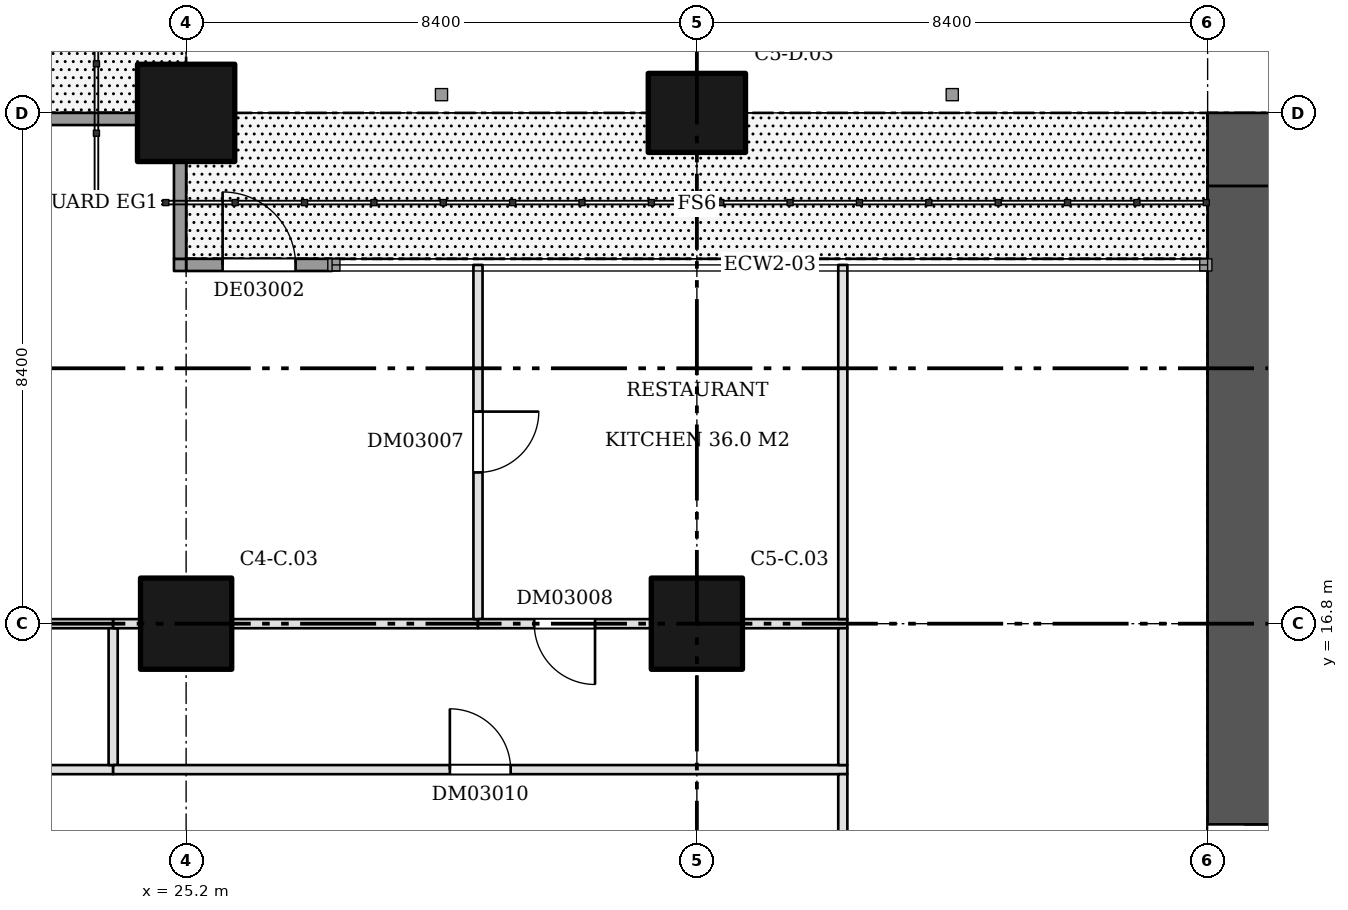
"""IFC4 building model, lengths in metres.
Left out: names, types, materials, properties, quantities, classifications, styles, units other than length and angle.
Written with IfcOpenShell. Run it as: python <this file> out.ifc"""

import sys

from ifc_helpers import new_model, si_unit, direction, frame, frame_2d, origin, origin_2d, place, context, subcontext, project, spatial, rectangle, extrude, element, fill, save


model = new_model("IFC4")
c1 = context("Model", 3, precision=1e-05, world=origin(), true_north=direction((0.0, 1.0)))
c2 = subcontext(c1, "Body", "Model", "MODEL_VIEW")
j1 = project(units=[si_unit("LENGTHUNIT", "METRE"), si_unit("PLANEANGLEUNIT", "RADIAN")], contexts=[c1])
p1 = place(None, origin())
s1 = spatial("IfcSite", under=j1, at=p1, CompositionType="ELEMENT")
p2 = place(p1, origin())
s2 = spatial("IfcBuilding", under=s1, at=p2, CompositionType="ELEMENT")
p3 = place(p2, frame((0.0, 0.0, 19.8)))
s3 = spatial("IfcBuildingStorey", under=s2, at=p3, CompositionType="ELEMENT", Elevation=19.8)
p4 = place(p3, frame((25.2, 16.8, 0.0), z_axis=(0.0, 0.0, 1.0), x_axis=(1.0, 0.0, 0.0)))
e1 = element("IfcColumn", 1, at=p4, inside=s3, PredefinedType="COLUMN", context=c2, shape_type="SweptSolid", body=[
    extrude(rectangle(XDim=1.5, YDim=1.5, at=origin_2d()), origin(), (0.0, 0.0, 1.0), 5.12),
])
p5 = place(p3, frame((25.2, 25.2, 0.0), z_axis=(0.0, 0.0, 1.0), x_axis=(1.0, 0.0, 0.0)))
e2 = element("IfcColumn", 2, at=p5, inside=s3, PredefinedType="COLUMN", context=c2, shape_type="SweptSolid", body=[
    extrude(rectangle(XDim=1.6, YDim=1.6, at=origin_2d()), origin(), (0.0, 0.0, 1.0), 5.12),
])
p6 = place(p3, frame((33.6, 16.8, 0.0), z_axis=(0.0, 0.0, 1.0), x_axis=(1.0, 0.0, 0.0)))
e3 = element("IfcColumn", 3, at=p6, inside=s3, PredefinedType="COLUMN", context=c2, shape_type="SweptSolid", body=[
    extrude(rectangle(XDim=1.5, YDim=1.5, at=origin_2d()), origin(), (0.0, 0.0, 1.0), 5.12),
])
p7 = place(p3, frame((33.6, 25.2, 0.0), z_axis=(0.0, 0.0, 1.0), x_axis=(1.0, 0.0, 0.0)))
e4 = element("IfcColumn", 4, at=p7, inside=s3, PredefinedType="COLUMN", context=c2, shape_type="SweptSolid", body=[
    extrude(rectangle(XDim=1.6, YDim=1.3, at=origin_2d()), origin(), (0.0, 0.0, 1.0), 5.12),
])
p8 = place(p3, frame((42.0, 24.6, 0.0), z_axis=(0.0, 0.0, 1.0), x_axis=(1.0, 0.0, 0.0)))
e5 = element("IfcWall", 5, at=p8, inside=s3, PredefinedType="SHEAR", context=c2, shape_type="SweptSolid", body=[
    extrude(rectangle(XDim=16.8, YDim=1.2, at=frame_2d((8.4, 0.0))), origin(), (0.0, 0.0, 1.0), 5.12),
])
p9 = place(p8, frame((1.8, 0.0, 0.5)))
e6 = element("IfcOpeningElement", 6, at=p9, cuts=e5, PredefinedType="OPENING", context=c2, shape_type="SweptSolid", body=[
    extrude(rectangle(XDim=1.8, YDim=2.4, at=frame_2d((0.9, 1.2))), frame((0.0, 0.61, 0.0), z_axis=(0.0, -1.0, 0.0), x_axis=(1.0, 0.0, 0.0)), (0.0, 0.0, 1.0), 1.22),
])
p10 = place(p8, frame((4.644, 0.0, 1.6)))
e7 = element("IfcOpeningElement", 7, at=p10, cuts=e5, PredefinedType="OPENING", context=c2, shape_type="SweptSolid", body=[
    extrude(rectangle(XDim=1.2, YDim=1.2, at=frame_2d((0.6, 0.6))), frame((0.0, 0.61, 0.0), z_axis=(0.0, -1.0, 0.0), x_axis=(1.0, 0.0, 0.0)), (0.0, 0.0, 1.0), 1.22),
])
p11 = place(p8, frame((6.45, 0.0, 1.6)))
e8 = element("IfcOpeningElement", 8, at=p11, cuts=e5, PredefinedType="OPENING", context=c2, shape_type="SweptSolid", body=[
    extrude(rectangle(XDim=1.8, YDim=1.2, at=frame_2d((0.9, 0.6))), frame((0.0, 0.61, 0.0), z_axis=(0.0, -1.0, 0.0), x_axis=(1.0, 0.0, 0.0)), (0.0, 0.0, 1.0), 1.22),
])
p12 = place(p8, frame((12.65, 0.0, 0.5)))
e9 = element("IfcOpeningElement", 9, at=p12, cuts=e5, PredefinedType="OPENING", context=c2, shape_type="SweptSolid", body=[
    extrude(rectangle(XDim=1.8, YDim=2.4, at=frame_2d((0.9, 1.2))), frame((0.0, 0.61, 0.0), z_axis=(0.0, -1.0, 0.0), x_axis=(1.0, 0.0, 0.0)), (0.0, 0.0, 1.0), 1.22),
])
p13 = place(p3, frame((42.6, 9.6, 0.0), z_axis=(0.0, 0.0, 1.0), x_axis=(0.0, 1.0, 0.0)))
e10 = element("IfcWall", 10, at=p13, inside=s3, PredefinedType="SHEAR", context=c2, shape_type="SweptSolid", body=[
    extrude(rectangle(XDim=14.4, YDim=1.2, at=frame_2d((7.2, 0.0))), origin(), (0.0, 0.0, 1.0), 5.12),
])
p14 = place(p13, frame((2.1, 0.0, 0.0)))
e11 = element("IfcOpeningElement", 11, at=p14, cuts=e10, PredefinedType="OPENING", context=c2, shape_type="SweptSolid", body=[
    extrude(rectangle(XDim=1.8, YDim=2.1, at=frame_2d((0.9, 1.05))), frame((0.0, 0.61, 0.0), z_axis=(0.0, -1.0, 0.0), x_axis=(1.0, 0.0, 0.0)), (0.0, 0.0, 1.0), 1.22),
])
p15 = place(p3, frame((16.9, 14.4, 0.0), z_axis=(0.0, 0.0, 1.0), x_axis=(1.0, 0.0, 0.0)))
e12 = element("IfcWall", 12, at=p15, inside=s3, PredefinedType="PARTITIONING", context=c2, shape_type="SweptSolid", body=[
    extrude(rectangle(XDim=7.1, YDim=0.15, at=frame_2d((3.55, 0.0))), origin(), (0.0, 0.0, 1.0), 5.12),
])
p16 = place(p15, frame((3.05, 0.0, 0.0)))
e13 = element("IfcOpeningElement", 13, at=p16, cuts=e12, PredefinedType="OPENING", context=c2, shape_type="SweptSolid", body=[
    extrude(rectangle(XDim=1.0, YDim=2.1, at=frame_2d((0.5, 1.05))), frame((0.0, 0.085, 0.0), z_axis=(0.0, -1.0, 0.0), x_axis=(1.0, 0.0, 0.0)), (0.0, 0.0, 1.0), 0.17),
])
p17 = place(p3, frame((18.55, 16.8, 0.0), z_axis=(0.0, 0.0, 1.0), x_axis=(1.0, 0.0, 0.0)))
e14 = element("IfcWall", 14, at=p17, inside=s3, PredefinedType="PARTITIONING", context=c2, shape_type="SweptSolid", body=[
    extrude(rectangle(XDim=5.45, YDim=0.15, at=frame_2d((2.725, 0.0))), origin(), (0.0, 0.0, 1.0), 5.12),
])
p18 = place(p3, frame((24.0, 14.475, 0.0), z_axis=(0.0, 0.0, 1.0), x_axis=(0.0, 1.0, 0.0)))
e15 = element("IfcWall", 15, at=p18, inside=s3, PredefinedType="PARTITIONING", context=c2, shape_type="SweptSolid", body=[
    extrude(rectangle(XDim=2.25, YDim=0.15, at=frame_2d((1.125, 0.0))), origin(), (0.0, 0.0, 1.0), 5.12),
])
p19 = place(p3, frame((24.0, 14.4, 0.0), z_axis=(0.0, 0.0, 1.0), x_axis=(1.0, 0.0, 0.0)))
e16 = element("IfcWall", 16, at=p19, inside=s3, PredefinedType="PARTITIONING", context=c2, shape_type="SweptSolid", body=[
    extrude(rectangle(XDim=12.075, YDim=0.15, at=frame_2d((6.038, 0.0))), origin(), (0.0, 0.0, 1.0), 5.12),
])
p20 = place(p19, frame((5.538, 0.0, 0.0)))
e17 = element("IfcOpeningElement", 17, at=p20, cuts=e16, PredefinedType="OPENING", context=c2, shape_type="SweptSolid", body=[
    extrude(rectangle(XDim=1.0, YDim=2.1, at=frame_2d((0.5, 1.05))), frame((0.0, 0.085, 0.0), z_axis=(0.0, -1.0, 0.0), x_axis=(1.0, 0.0, 0.0)), (0.0, 0.0, 1.0), 0.17),
])
p21 = place(p3, frame((24.0, 16.8, 0.0), z_axis=(0.0, 0.0, 1.0), x_axis=(1.0, 0.0, 0.0)))
e18 = element("IfcWall", 18, at=p21, inside=s3, PredefinedType="PARTITIONING", context=c2, shape_type="SweptSolid", body=[
    extrude(rectangle(XDim=0.45, YDim=0.15, at=frame_2d((0.225, 0.0))), origin(), (0.0, 0.0, 1.0), 5.12),
])
p22 = place(p3, frame((25.95, 16.8, 0.0), z_axis=(0.0, 0.0, 1.0), x_axis=(1.0, 0.0, 0.0)))
e19 = element("IfcWall", 19, at=p22, inside=s3, PredefinedType="PARTITIONING", context=c2, shape_type="SweptSolid", body=[
    extrude(rectangle(XDim=4.05, YDim=0.15, at=frame_2d((2.025, 0.0))), origin(), (0.0, 0.0, 1.0), 5.12),
])
p23 = place(p3, frame((30.0, 16.875, 0.0), z_axis=(0.0, 0.0, 1.0), x_axis=(0.0, 1.0, 0.0)))
e20 = element("IfcWall", 20, at=p23, inside=s3, PredefinedType="PARTITIONING", context=c2, shape_type="SweptSolid", body=[
    extrude(rectangle(XDim=5.825, YDim=0.15, at=frame_2d((2.913, 0.0))), origin(), (0.0, 0.0, 1.0), 5.12),
])
p24 = place(p23, frame((2.413, 0.0, 0.0)))
e21 = element("IfcOpeningElement", 21, at=p24, cuts=e20, PredefinedType="OPENING", context=c2, shape_type="SweptSolid", body=[
    extrude(rectangle(XDim=1.0, YDim=2.1, at=frame_2d((0.5, 1.05))), frame((0.0, 0.085, 0.0), z_axis=(0.0, -1.0, 0.0), x_axis=(1.0, 0.0, 0.0)), (0.0, 0.0, 1.0), 0.17),
])
p25 = place(p3, frame((30.0, 16.8, 0.0), z_axis=(0.0, 0.0, 1.0), x_axis=(1.0, 0.0, 0.0)))
e22 = element("IfcWall", 22, at=p25, inside=s3, PredefinedType="PARTITIONING", context=c2, shape_type="SweptSolid", body=[
    extrude(rectangle(XDim=2.85, YDim=0.15, at=frame_2d((1.425, 0.0))), origin(), (0.0, 0.0, 1.0), 5.12),
])
p26 = place(p25, frame((0.925, 0.0, 0.0)))
e23 = element("IfcOpeningElement", 23, at=p26, cuts=e22, PredefinedType="OPENING", context=c2, shape_type="SweptSolid", body=[
    extrude(rectangle(XDim=1.0, YDim=2.1, at=frame_2d((0.5, 1.05))), frame((0.0, 0.085, 0.0), z_axis=(0.0, -1.0, 0.0), x_axis=(1.0, 0.0, 0.0)), (0.0, 0.0, 1.0), 0.17),
])
p27 = place(p3, frame((34.35, 16.8, 0.0), z_axis=(0.0, 0.0, 1.0), x_axis=(1.0, 0.0, 0.0)))
e24 = element("IfcWall", 24, at=p27, inside=s3, PredefinedType="PARTITIONING", context=c2, shape_type="SweptSolid", body=[
    extrude(rectangle(XDim=1.725, YDim=0.15, at=frame_2d((0.862, 0.0))), origin(), (0.0, 0.0, 1.0), 5.12),
])
p28 = place(p3, frame((36.0, 10.875, 0.0), z_axis=(0.0, 0.0, 1.0), x_axis=(0.0, 1.0, 0.0)))
e25 = element("IfcWall", 25, at=p28, inside=s3, PredefinedType="PARTITIONING", context=c2, shape_type="SweptSolid", body=[
    extrude(rectangle(XDim=3.45, YDim=0.15, at=frame_2d((1.725, 0.0))), origin(), (0.0, 0.0, 1.0), 5.12),
])
p29 = place(p3, frame((36.0, 14.475, 0.0), z_axis=(0.0, 0.0, 1.0), x_axis=(0.0, 1.0, 0.0)))
e26 = element("IfcWall", 26, at=p29, inside=s3, PredefinedType="PARTITIONING", context=c2, shape_type="SweptSolid", body=[
    extrude(rectangle(XDim=2.25, YDim=0.15, at=frame_2d((1.125, 0.0))), origin(), (0.0, 0.0, 1.0), 5.12),
])
p30 = place(p3, frame((36.0, 16.875, 0.0), z_axis=(0.0, 0.0, 1.0), x_axis=(0.0, 1.0, 0.0)))
e27 = element("IfcWall", 27, at=p30, inside=s3, PredefinedType="PARTITIONING", context=c2, shape_type="SweptSolid", body=[
    extrude(rectangle(XDim=5.825, YDim=0.15, at=frame_2d((2.913, 0.0))), origin(), (0.0, 0.0, 1.0), 5.12),
])
p31 = place(p3, frame((27.6, 22.7, 0.0), z_axis=(0.0, 0.0, 1.0), x_axis=(-1.0, 0.0, 0.0)))
e28 = element("IfcWall", 28, at=p31, inside=s3, PredefinedType="SOLIDWALL", context=c2, shape_type="SweptSolid", body=[
    extrude(rectangle(XDim=2.4, YDim=0.2, at=frame_2d((1.2, 0.0))), origin(), (0.0, 0.0, 1.0), 5.12),
])
p32 = place(p31, frame((0.6, 0.0, 0.0)))
e29 = element("IfcOpeningElement", 29, at=p32, cuts=e28, PredefinedType="OPENING", context=c2, shape_type="SweptSolid", body=[
    extrude(rectangle(XDim=1.2, YDim=2.4, at=frame_2d((0.6, 1.2))), frame((0.0, 0.11, 0.0), z_axis=(0.0, -1.0, 0.0), x_axis=(1.0, 0.0, 0.0)), (0.0, 0.0, 1.0), 0.22),
])
p33 = place(p3, frame((25.2, 22.7, 0.0), z_axis=(0.0, 0.0, 1.0), x_axis=(-1.0, 0.0, 0.0)))
e30 = element("IfcWall", 30, at=p33, inside=s3, PredefinedType="SOLIDWALL", context=c2, shape_type="SweptSolid", body=[
    extrude(rectangle(XDim=0.2, YDim=0.2, at=frame_2d((0.1, 0.0))), origin(), (0.0, 0.0, 1.0), 5.12),
])
p34 = place(p3, frame((25.1, 22.8, 0.0), z_axis=(0.0, 0.0, 1.0), x_axis=(0.0, 1.0, 0.0)))
e31 = element("IfcWall", 31, at=p34, inside=s3, PredefinedType="SOLIDWALL", context=c2, shape_type="SweptSolid", body=[
    extrude(rectangle(XDim=1.6, YDim=0.2, at=frame_2d((0.8, 0.0))), origin(), (0.0, 0.0, 1.0), 5.12),
])
p35 = place(p3, frame((24.4, 25.1, 0.0), z_axis=(0.0, 0.0, 1.0), x_axis=(-1.0, 0.0, 0.0)))
e32 = element("IfcWall", 32, at=p35, inside=s3, PredefinedType="SOLIDWALL", context=c2, shape_type="SweptSolid", body=[
    extrude(rectangle(XDim=1.8, YDim=0.2, at=frame_2d((0.9, 0.0))), origin(), (0.0, 0.0, 1.0), 5.12),
])
p36 = place(p14, frame((1.8, 0.0, 0.0), z_axis=(0.0, 0.0, 1.0), x_axis=(-1.0, 0.0, 0.0)))
e33 = element("IfcDoor", 33, at=p36, inside=s3, OperationType="DOUBLE_DOOR_SINGLE_SWING", PredefinedType="DOOR", context=c2, shape_type="SweptSolid", body=[
    extrude(rectangle(XDim=1.8, YDim=2.1, at=frame_2d((0.9, 1.05))), frame((0.0, 0.025, 0.0), z_axis=(0.0, -1.0, 0.0), x_axis=(1.0, 0.0, 0.0)), (0.0, 0.0, 1.0), 0.05),
])
fill(e11, e33)
p37 = place(p24, frame((1.0, 0.0, 0.0), z_axis=(0.0, 0.0, 1.0), x_axis=(-1.0, 0.0, 0.0)))
e34 = element("IfcDoor", 34, at=p37, inside=s3, OperationType="SINGLE_SWING_LEFT", PredefinedType="DOOR", context=c2, shape_type="SweptSolid", body=[
    extrude(rectangle(XDim=1.0, YDim=2.1, at=frame_2d((0.5, 1.05))), frame((0.0, 0.025, 0.0), z_axis=(0.0, -1.0, 0.0), x_axis=(1.0, 0.0, 0.0)), (0.0, 0.0, 1.0), 0.05),
])
fill(e21, e34)
p38 = place(p26, frame((1.0, 0.0, 0.0), z_axis=(0.0, 0.0, 1.0), x_axis=(-1.0, 0.0, 0.0)))
e35 = element("IfcDoor", 35, at=p38, inside=s3, OperationType="SINGLE_SWING_LEFT", PredefinedType="DOOR", context=c2, shape_type="SweptSolid", body=[
    extrude(rectangle(XDim=1.0, YDim=2.1, at=frame_2d((0.5, 1.05))), frame((0.0, 0.025, 0.0), z_axis=(0.0, -1.0, 0.0), x_axis=(1.0, 0.0, 0.0)), (0.0, 0.0, 1.0), 0.05),
])
fill(e23, e35)
p39 = place(p20, origin())
e36 = element("IfcDoor", 36, at=p39, inside=s3, OperationType="SINGLE_SWING_LEFT", PredefinedType="DOOR", context=c2, shape_type="SweptSolid", body=[
    extrude(rectangle(XDim=1.0, YDim=2.1, at=frame_2d((0.5, 1.05))), frame((0.0, 0.025, 0.0), z_axis=(0.0, -1.0, 0.0), x_axis=(1.0, 0.0, 0.0)), (0.0, 0.0, 1.0), 0.05),
])
fill(e17, e36)
p40 = place(p32, frame((1.2, 0.0, 0.0), z_axis=(0.0, 0.0, 1.0), x_axis=(-1.0, 0.0, 0.0)))
e37 = element("IfcDoor", 37, at=p40, inside=s3, OperationType="SINGLE_SWING_LEFT", PredefinedType="DOOR", context=c2, shape_type="SweptSolid", body=[
    extrude(rectangle(XDim=1.2, YDim=2.4, at=frame_2d((0.6, 1.2))), frame((0.0, 0.025, 0.0), z_axis=(0.0, -1.0, 0.0), x_axis=(1.0, 0.0, 0.0)), (0.0, 0.0, 1.0), 0.05),
])
fill(e29, e37)
save(model, sys.argv[1])
